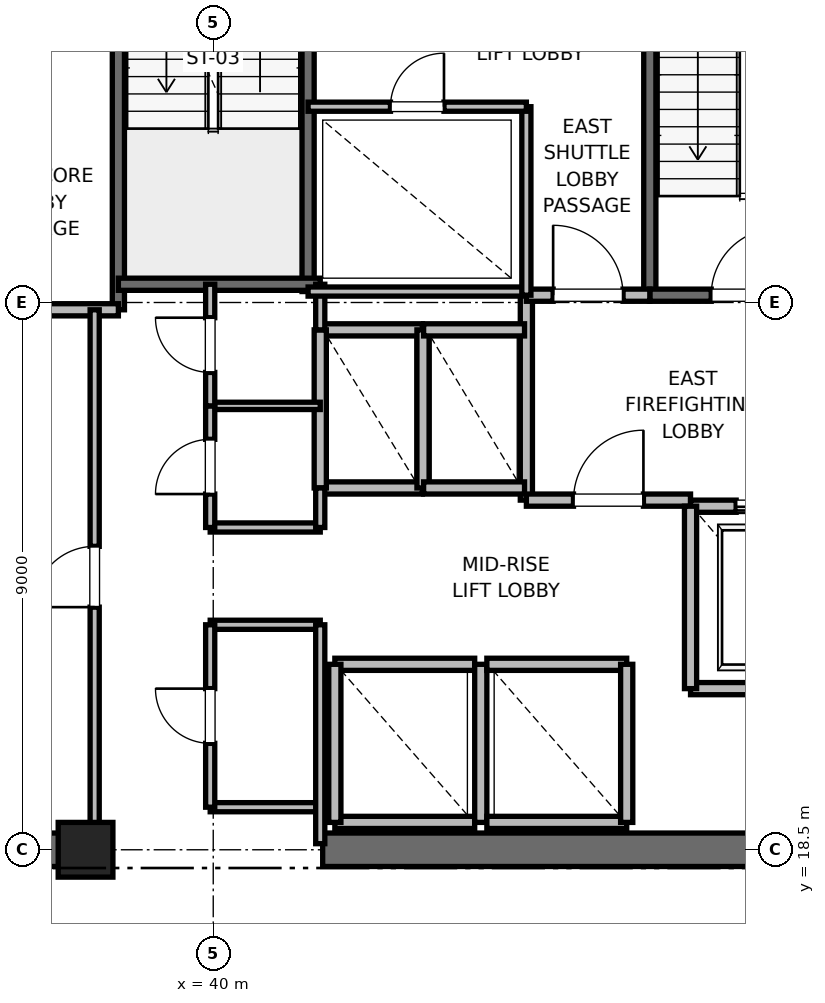
"""IFC4 building model, lengths in metres.
Left out: names, types, materials, properties, quantities, classifications, styles, units other than length and angle.
Written with IfcOpenShell. Run it as: python <this file> out.ifc"""

import sys

from ifc_helpers import new_model, si_unit, direction, frame, frame_2d, origin, origin_2d, place, context, subcontext, project, spatial, rectangle, extrude, element, fill, save


model = new_model("IFC4")
c1 = context("Model", 3, precision=1e-05, world=origin(), true_north=direction((0.0, 1.0)))
c2 = subcontext(c1, "Body", "Model", "MODEL_VIEW")
j1 = project(units=[si_unit("LENGTHUNIT", "METRE"), si_unit("PLANEANGLEUNIT", "RADIAN")], contexts=[c1])
p1 = place(None, origin())
s1 = spatial("IfcSite", under=j1, at=p1, CompositionType="ELEMENT")
p2 = place(p1, origin())
s2 = spatial("IfcBuilding", under=s1, at=p2, CompositionType="ELEMENT")
p3 = place(p2, frame((0.0, 0.0, 238.2)))
s3 = spatial("IfcBuildingStorey", under=s2, at=p3, CompositionType="ELEMENT", Elevation=238.2)
p4 = place(p3, frame((37.9, 18.5, 0.0), z_axis=(0.0, 0.0, 1.0), x_axis=(1.0, 0.0, 0.0)))
e1 = element("IfcColumn", 1, at=p4, inside=s3, PredefinedType="PILASTER", context=c2, shape_type="SweptSolid", body=[
    extrude(rectangle(XDim=0.9, YDim=0.9, at=origin_2d()), origin(), (0.0, 0.0, 1.0), 5.0),
])
for number, where, z_axis, x_axis in (
    (2, (29.0, 18.5, 0.0), (0.0, 0.0, 1.0), (1.0, 0.0, 0.0)),
    (3, (41.8, 18.5, 0.0), (0.0, 0.0, 1.0), (1.0, 0.0, 0.0)),
):
    element("IfcWall", number, at=place(p3, frame(where, z_axis=z_axis, x_axis=x_axis)), inside=s3, PredefinedType="SHEAR", context=c2, shape_type="SweptSolid", body=[
        extrude(rectangle(XDim=9.2, YDim=0.55, at=frame_2d((4.6, 0.0))), origin(), (0.0, 0.0, 1.0), 4.785),
    ])
p5 = place(p3, frame((47.18, 27.62, 0.0), z_axis=(0.0, 0.0, 1.0), x_axis=(0.0, 1.0, 0.0)))
e4 = element("IfcWall", 4, at=p5, inside=s3, PredefinedType="SOLIDWALL", context=c2, shape_type="SweptSolid", body=[
    extrude(rectangle(XDim=8.18, YDim=0.2, at=frame_2d((4.09, 0.0))), origin(), (0.0, 0.0, 1.0), 4.785),
])
p6 = place(p3, frame((47.18, 27.62, 0.0), z_axis=(0.0, 0.0, 1.0), x_axis=(1.0, 0.0, 0.0)))
e5 = element("IfcWall", 5, at=p6, inside=s3, PredefinedType="SOLIDWALL", context=c2, shape_type="SweptSolid", body=[
    extrude(rectangle(XDim=3.12, YDim=0.2, at=frame_2d((1.56, 0.0))), origin(), (0.0, 0.0, 1.0), 4.785),
])
p7 = place(p6, frame((1.01, 0.0, 0.0)))
e6 = element("IfcOpeningElement", 6, at=p7, cuts=e5, PredefinedType="OPENING", context=c2, shape_type="SweptSolid", body=[
    extrude(rectangle(XDim=1.1, YDim=2.15, at=frame_2d((0.55, 1.075))), frame((0.0, 0.1, 0.0), z_axis=(0.0, -1.0, 0.0), x_axis=(1.0, 0.0, 0.0)), (0.0, 0.0, 1.0), 0.2),
])
p8 = place(p3, frame((38.44, 27.38, 0.0), z_axis=(0.0, 0.0, 1.0), x_axis=(0.0, 1.0, 0.0)))
e7 = element("IfcWall", 7, at=p8, inside=s3, PredefinedType="SOLIDWALL", context=c2, shape_type="SweptSolid", body=[
    extrude(rectangle(XDim=8.87, YDim=0.2, at=frame_2d((4.435, 0.0))), origin(), (0.0, 0.0, 1.0), 4.785),
])
p9 = place(p3, frame((41.56, 27.68, 0.0), z_axis=(0.0, 0.0, 1.0), x_axis=(0.0, 1.0, 0.0)))
e8 = element("IfcWall", 8, at=p9, inside=s3, PredefinedType="SOLIDWALL", context=c2, shape_type="SweptSolid", body=[
    extrude(rectangle(XDim=8.57, YDim=0.2, at=frame_2d((4.285, 0.0))), origin(), (0.0, 0.0, 1.0), 4.785),
])
p10 = place(p3, frame((38.44, 27.8, 0.0), z_axis=(0.0, 0.0, 1.0), x_axis=(1.0, 0.0, 0.0)))
e9 = element("IfcWall", 9, at=p10, inside=s3, PredefinedType="SOLIDWALL", context=c2, shape_type="SweptSolid", body=[
    extrude(rectangle(XDim=3.32, YDim=0.2, at=frame_2d((1.66, 0.0))), origin(), (0.0, 0.0, 1.0), 4.785),
])
p11 = place(p3, frame((32.82, 27.38, 0.0), z_axis=(0.0, 0.0, 1.0), x_axis=(1.0, 0.0, 0.0)))
e10 = element("IfcWall", 10, at=p11, inside=s3, PredefinedType="PARTITIONING", context=c2, shape_type="SweptSolid", body=[
    extrude(rectangle(XDim=5.62, YDim=0.2, at=frame_2d((2.81, 0.0))), origin(), (0.0, 0.0, 1.0), 4.785),
])
p12 = place(p3, frame((45.15, 24.25, 0.0), z_axis=(0.0, 0.0, 1.0), x_axis=(0.0, 1.0, 0.0)))
e11 = element("IfcWall", 11, at=p12, inside=s3, PredefinedType="PARTITIONING", context=c2, shape_type="SweptSolid", body=[
    extrude(rectangle(XDim=3.37, YDim=0.2, at=frame_2d((1.685, 0.0))), origin(), (0.0, 0.0, 1.0), 4.785),
])
p13 = place(p3, frame((45.15, 24.25, 0.0), z_axis=(0.0, 0.0, 1.0), x_axis=(1.0, 0.0, 0.0)))
e12 = element("IfcWall", 12, at=p13, inside=s3, PredefinedType="PARTITIONING", context=c2, shape_type="SweptSolid", body=[
    extrude(rectangle(XDim=2.7, YDim=0.2, at=frame_2d((1.35, 0.0))), origin(), (0.0, 0.0, 1.0), 4.785),
])
p14 = place(p13, frame((0.775, 0.0, 0.0)))
e13 = element("IfcOpeningElement", 13, at=p14, cuts=e12, PredefinedType="OPENING", context=c2, shape_type="SweptSolid", body=[
    extrude(rectangle(XDim=1.15, YDim=2.2, at=frame_2d((0.575, 1.1))), frame((0.0, 0.1, 0.0), z_axis=(0.0, -1.0, 0.0), x_axis=(1.0, 0.0, 0.0)), (0.0, 0.0, 1.0), 0.2),
])
p15 = place(p3, frame((45.15, 27.62, 0.0), z_axis=(0.0, 0.0, 1.0), x_axis=(1.0, 0.0, 0.0)))
e14 = element("IfcWall", 14, at=p15, inside=s3, PredefinedType="PARTITIONING", context=c2, shape_type="SweptSolid", body=[
    extrude(rectangle(XDim=2.03, YDim=0.2, at=frame_2d((1.015, 0.0))), origin(), (0.0, 0.0, 1.0), 4.785),
])
p16 = place(p15, frame((0.44, 0.0, 0.0)))
e15 = element("IfcOpeningElement", 15, at=p16, cuts=e14, PredefinedType="OPENING", context=c2, shape_type="SweptSolid", body=[
    extrude(rectangle(XDim=1.15, YDim=2.2, at=frame_2d((0.575, 1.1))), frame((0.0, 0.1, 0.0), z_axis=(0.0, -1.0, 0.0), x_axis=(1.0, 0.0, 0.0)), (0.0, 0.0, 1.0), 0.2),
])
p17 = place(p3, frame((47.85, 21.15, 0.0), z_axis=(0.0, 0.0, 1.0), x_axis=(1.0, 0.0, 0.0)))
e16 = element("IfcWall", 16, at=p17, inside=s3, PredefinedType="SOLIDWALL", context=c2, shape_type="SweptSolid", body=[
    extrude(rectangle(XDim=2.6, YDim=0.2, at=frame_2d((1.3, 0.0))), origin(), (0.0, 0.0, 1.0), 4.785),
])
p18 = place(p3, frame((50.45, 24.15, 0.0), z_axis=(0.0, 0.0, 1.0), x_axis=(-1.0, 0.0, 0.0)))
e17 = element("IfcWall", 17, at=p18, inside=s3, PredefinedType="SOLIDWALL", context=c2, shape_type="SweptSolid", body=[
    extrude(rectangle(XDim=2.6, YDim=0.2, at=frame_2d((1.3, 0.0))), origin(), (0.0, 0.0, 1.0), 3.765),
])
p19 = place(p18, frame((0.75, 0.0, 0.0)))
e18 = element("IfcOpeningElement", 18, at=p19, cuts=e17, PredefinedType="OPENING", context=c2, shape_type="SweptSolid", body=[
    extrude(rectangle(XDim=1.1, YDim=2.2, at=frame_2d((0.55, 1.1))), frame((0.0, 0.1, 0.0), z_axis=(0.0, -1.0, 0.0), x_axis=(1.0, 0.0, 0.0)), (0.0, 0.0, 1.0), 0.2),
])
p20 = place(p3, frame((47.85, 24.15, 0.0), z_axis=(0.0, 0.0, 1.0), x_axis=(0.0, -1.0, 0.0)))
e19 = element("IfcWall", 19, at=p20, inside=s3, PredefinedType="SOLIDWALL", context=c2, shape_type="SweptSolid", body=[
    extrude(rectangle(XDim=3.0, YDim=0.2, at=frame_2d((1.5, 0.0))), origin(), (0.0, 0.0, 1.0), 4.785),
])
p21 = place(p3, frame((42.0, 18.95, 0.0), z_axis=(0.0, 0.0, 1.0), x_axis=(1.0, 0.0, 0.0)))
e20 = element("IfcWall", 20, at=p21, inside=s3, PredefinedType="SOLIDWALL", context=c2, shape_type="SweptSolid", body=[
    extrude(rectangle(XDim=2.3, YDim=0.2, at=frame_2d((1.15, 0.0))), origin(), (0.0, 0.0, 1.0), 3.765),
])
p22 = place(p3, frame((44.3, 21.55, 0.0), z_axis=(0.0, 0.0, 1.0), x_axis=(-1.0, 0.0, 0.0)))
e21 = element("IfcWall", 21, at=p22, inside=s3, PredefinedType="SOLIDWALL", context=c2, shape_type="SweptSolid", body=[
    extrude(rectangle(XDim=2.3, YDim=0.2, at=frame_2d((1.15, 0.0))), origin(), (0.0, 0.0, 1.0), 4.785),
])
p23 = place(p3, frame((42.0, 21.55, 0.0), z_axis=(0.0, 0.0, 1.0), x_axis=(0.0, -1.0, 0.0)))
e22 = element("IfcWall", 22, at=p23, inside=s3, PredefinedType="SOLIDWALL", context=c2, shape_type="SweptSolid", body=[
    extrude(rectangle(XDim=2.6, YDim=0.2, at=frame_2d((1.3, 0.0))), origin(), (0.0, 0.0, 1.0), 3.765),
])
p24 = place(p3, frame((44.4, 18.95, 0.0), z_axis=(0.0, 0.0, 1.0), x_axis=(0.0, 1.0, 0.0)))
e23 = element("IfcWall", 23, at=p24, inside=s3, PredefinedType="SOLIDWALL", context=c2, shape_type="SweptSolid", body=[
    extrude(rectangle(XDim=2.6, YDim=0.2, at=frame_2d((1.3, 0.0))), origin(), (0.0, 0.0, 1.0), 4.785),
])
for number, where, z_axis, x_axis in (
    (24, (44.5, 18.95, 0.0), (0.0, 0.0, 1.0), (1.0, 0.0, 0.0)),
    (25, (46.8, 21.55, 0.0), (0.0, 0.0, 1.0), (-1.0, 0.0, 0.0)),
):
    element("IfcWall", number, at=place(p3, frame(where, z_axis=z_axis, x_axis=x_axis)), inside=s3, PredefinedType="SOLIDWALL", context=c2, shape_type="SweptSolid", body=[
        extrude(rectangle(XDim=2.3, YDim=0.2, at=frame_2d((1.15, 0.0))), origin(), (0.0, 0.0, 1.0), 4.785),
    ])
p25 = place(p3, frame((46.8, 18.95, 0.0), z_axis=(0.0, 0.0, 1.0), x_axis=(0.0, 1.0, 0.0)))
e26 = element("IfcWall", 26, at=p25, inside=s3, PredefinedType="SOLIDWALL", context=c2, shape_type="SweptSolid", body=[
    extrude(rectangle(XDim=2.6, YDim=0.2, at=frame_2d((1.3, 0.0))), origin(), (0.0, 0.0, 1.0), 4.785),
])
for number, where, z_axis, x_axis in (
    (27, (41.76, 24.45, 0.0), (0.0, 0.0, 1.0), (1.0, 0.0, 0.0)),
    (28, (43.44, 27.05, 0.0), (0.0, 0.0, 1.0), (-1.0, 0.0, 0.0)),
):
    element("IfcWall", number, at=place(p3, frame(where, z_axis=z_axis, x_axis=x_axis)), inside=s3, PredefinedType="SOLIDWALL", context=c2, shape_type="SweptSolid", body=[
        extrude(rectangle(XDim=1.68, YDim=0.2, at=frame_2d((0.84, 0.0))), origin(), (0.0, 0.0, 1.0), 4.785),
    ])
for number, where, z_axis, x_axis in (
    (29, (41.76, 27.05, 0.0), (0.0, 0.0, 1.0), (0.0, -1.0, 0.0)),
    (30, (43.45, 24.45, 0.0), (0.0, 0.0, 1.0), (0.0, 1.0, 0.0)),
):
    element("IfcWall", number, at=place(p3, frame(where, z_axis=z_axis, x_axis=x_axis)), inside=s3, PredefinedType="SOLIDWALL", context=c2, shape_type="SweptSolid", body=[
        extrude(rectangle(XDim=2.6, YDim=0.2, at=frame_2d((1.3, 0.0))), origin(), (0.0, 0.0, 1.0), 4.785),
    ])
for number, where, z_axis, x_axis in (
    (31, (43.46, 24.45, 0.0), (0.0, 0.0, 1.0), (1.0, 0.0, 0.0)),
    (32, (45.12, 27.05, 0.0), (0.0, 0.0, 1.0), (-1.0, 0.0, 0.0)),
):
    element("IfcWall", number, at=place(p3, frame(where, z_axis=z_axis, x_axis=x_axis)), inside=s3, PredefinedType="SOLIDWALL", context=c2, shape_type="SweptSolid", body=[
        extrude(rectangle(XDim=1.66, YDim=0.2, at=frame_2d((0.83, 0.0))), origin(), (0.0, 0.0, 1.0), 4.785),
    ])
for number, where, z_axis, x_axis in (
    (33, (39.95, 19.2, 0.0), (0.0, 0.0, 1.0), (1.0, 0.0, 0.0)),
    (34, (39.95, 22.2, 0.0), (0.0, 0.0, 1.0), (1.0, 0.0, 0.0)),
    (35, (39.95, 23.8, 0.0), (0.0, 0.0, 1.0), (1.0, 0.0, 0.0)),
):
    element("IfcWall", number, at=place(p3, frame(where, z_axis=z_axis, x_axis=x_axis)), inside=s3, PredefinedType="PARTITIONING", context=c2, shape_type="SweptSolid", body=[
        extrude(rectangle(XDim=1.81, YDim=0.15, at=frame_2d((0.905, 0.0))), origin(), (0.0, 0.0, 1.0), 2.85),
    ])
p26 = place(p3, frame((39.95, 25.8, 0.0), z_axis=(0.0, 0.0, 1.0), x_axis=(1.0, 0.0, 0.0)))
e36 = element("IfcWall", 36, at=p26, inside=s3, PredefinedType="PARTITIONING", context=c2, shape_type="SweptSolid", body=[
    extrude(rectangle(XDim=1.81, YDim=0.12, at=frame_2d((0.905, 0.0))), origin(), (0.0, 0.0, 1.0), 2.85),
])
p27 = place(p3, frame((41.76, 18.6, 0.0), z_axis=(0.0, 0.0, 1.0), x_axis=(0.0, 1.0, 0.0)))
e37 = element("IfcWall", 37, at=p27, inside=s3, PredefinedType="PARTITIONING", context=c2, shape_type="SweptSolid", body=[
    extrude(rectangle(XDim=3.6, YDim=0.15, at=frame_2d((1.8, 0.0))), origin(), (0.0, 0.0, 1.0), 2.85),
])
p28 = place(p3, frame((41.76, 23.8, 0.0), z_axis=(0.0, 0.0, 1.0), x_axis=(0.0, 1.0, 0.0)))
e38 = element("IfcWall", 38, at=p28, inside=s3, PredefinedType="PARTITIONING", context=c2, shape_type="SweptSolid", body=[
    extrude(rectangle(XDim=0.65, YDim=0.15, at=frame_2d((0.325, 0.0))), origin(), (0.0, 0.0, 1.0), 2.85),
])
p29 = place(p3, frame((41.76, 27.05, 0.0), z_axis=(0.0, 0.0, 1.0), x_axis=(0.0, 1.0, 0.0)))
e39 = element("IfcWall", 39, at=p29, inside=s3, PredefinedType="PARTITIONING", context=c2, shape_type="SweptSolid", body=[
    extrude(rectangle(XDim=0.75, YDim=0.15, at=frame_2d((0.375, 0.0))), origin(), (0.0, 0.0, 1.0), 2.85),
])
p30 = place(p3, frame((39.95, 19.2, 0.0), z_axis=(0.0, 0.0, 1.0), x_axis=(0.0, 1.0, 0.0)))
e40 = element("IfcWall", 40, at=p30, inside=s3, PredefinedType="PARTITIONING", context=c2, shape_type="SweptSolid", body=[
    extrude(rectangle(XDim=3.0, YDim=0.15, at=frame_2d((1.5, 0.0))), origin(), (0.0, 0.0, 1.0), 2.85),
])
p31 = place(p30, frame((1.05, 0.0, 0.0)))
e41 = element("IfcOpeningElement", 41, at=p31, cuts=e40, PredefinedType="OPENING", context=c2, shape_type="SweptSolid", body=[
    extrude(rectangle(XDim=0.9, YDim=2.1, at=frame_2d((0.45, 1.05))), frame((0.0, 0.075, 0.0), z_axis=(0.0, -1.0, 0.0), x_axis=(1.0, 0.0, 0.0)), (0.0, 0.0, 1.0), 0.15),
])
p32 = place(p3, frame((39.95, 23.8, 0.0), z_axis=(0.0, 0.0, 1.0), x_axis=(0.0, 1.0, 0.0)))
e42 = element("IfcWall", 42, at=p32, inside=s3, PredefinedType="PARTITIONING", context=c2, shape_type="SweptSolid", body=[
    extrude(rectangle(XDim=2.0, YDim=0.15, at=frame_2d((1.0, 0.0))), origin(), (0.0, 0.0, 1.0), 2.85),
])
p33 = place(p32, frame((0.55, 0.0, 0.0)))
e43 = element("IfcOpeningElement", 43, at=p33, cuts=e42, PredefinedType="OPENING", context=c2, shape_type="SweptSolid", body=[
    extrude(rectangle(XDim=0.9, YDim=2.1, at=frame_2d((0.45, 1.05))), frame((0.0, 0.075, 0.0), z_axis=(0.0, -1.0, 0.0), x_axis=(1.0, 0.0, 0.0)), (0.0, 0.0, 1.0), 0.15),
])
p34 = place(p3, frame((39.95, 25.8, 0.0), z_axis=(0.0, 0.0, 1.0), x_axis=(0.0, 1.0, 0.0)))
e44 = element("IfcWall", 44, at=p34, inside=s3, PredefinedType="PARTITIONING", context=c2, shape_type="SweptSolid", body=[
    extrude(rectangle(XDim=2.0, YDim=0.15, at=frame_2d((1.0, 0.0))), origin(), (0.0, 0.0, 1.0), 2.85),
])
p35 = place(p34, frame((0.55, 0.0, 0.0)))
e45 = element("IfcOpeningElement", 45, at=p35, cuts=e44, PredefinedType="OPENING", context=c2, shape_type="SweptSolid", body=[
    extrude(rectangle(XDim=0.9, YDim=2.1, at=frame_2d((0.45, 1.05))), frame((0.0, 0.075, 0.0), z_axis=(0.0, -1.0, 0.0), x_axis=(1.0, 0.0, 0.0)), (0.0, 0.0, 1.0), 0.15),
])
p36 = place(p3, frame((38.05, 18.6, 0.0), z_axis=(0.0, 0.0, 1.0), x_axis=(0.0, 1.0, 0.0)))
e46 = element("IfcWall", 46, at=p36, inside=s3, PredefinedType="PARTITIONING", context=c2, shape_type="SweptSolid", body=[
    extrude(rectangle(XDim=8.78, YDim=0.15, at=frame_2d((4.39, 0.0))), origin(), (0.0, 0.0, 1.0), 2.85),
])
p37 = place(p36, frame((3.89, 0.0, 0.0)))
e47 = element("IfcOpeningElement", 47, at=p37, cuts=e46, PredefinedType="OPENING", context=c2, shape_type="SweptSolid", body=[
    extrude(rectangle(XDim=1.0, YDim=2.15, at=frame_2d((0.5, 1.075))), frame((0.0, 0.075, 0.0), z_axis=(0.0, -1.0, 0.0), x_axis=(1.0, 0.0, 0.0)), (0.0, 0.0, 1.0), 0.15),
])
p38 = place(p3, frame((41.56, 27.68, 0.0), z_axis=(0.0, 0.0, 1.0), x_axis=(1.0, 0.0, 0.0)))
e48 = element("IfcWall", 48, at=p38, inside=s3, PredefinedType="PARTITIONING", context=c2, shape_type="SweptSolid", body=[
    extrude(rectangle(XDim=3.59, YDim=0.15, at=frame_2d((1.795, 0.0))), origin(), (0.0, 0.0, 1.0), 2.85),
])
p39 = place(p3, frame((45.15, 27.62, 0.0), z_axis=(0.0, 0.0, 1.0), x_axis=(0.0, 1.0, 0.0)))
e49 = element("IfcWall", 49, at=p39, inside=s3, PredefinedType="PARTITIONING", context=c2, shape_type="SweptSolid", body=[
    extrude(rectangle(XDim=3.1, YDim=0.15, at=frame_2d((1.55, 0.0))), origin(), (0.0, 0.0, 1.0), 2.85),
])
p40 = place(p3, frame((41.56, 30.72, 0.0), z_axis=(0.0, 0.0, 1.0), x_axis=(1.0, 0.0, 0.0)))
e50 = element("IfcWall", 50, at=p40, inside=s3, PredefinedType="PARTITIONING", context=c2, shape_type="SweptSolid", body=[
    extrude(rectangle(XDim=3.59, YDim=0.15, at=frame_2d((1.795, 0.0))), origin(), (0.0, 0.0, 1.0), 2.85),
])
p41 = place(p40, frame((1.355, 0.0, 0.0)))
e51 = element("IfcOpeningElement", 51, at=p41, cuts=e50, PredefinedType="OPENING", context=c2, shape_type="SweptSolid", body=[
    extrude(rectangle(XDim=0.88, YDim=2.1, at=frame_2d((0.44, 1.05))), frame((0.0, 0.075, 0.0), z_axis=(0.0, -1.0, 0.0), x_axis=(1.0, 0.0, 0.0)), (0.0, 0.0, 1.0), 0.15),
])
p42 = place(p7, origin())
e52 = element("IfcDoor", 52, at=p42, inside=s3, OperationType="SINGLE_SWING_RIGHT", PredefinedType="DOOR", context=c2, shape_type="SweptSolid", body=[
    extrude(rectangle(XDim=1.1, YDim=2.15, at=frame_2d((0.55, 1.075))), frame((0.0, 0.025, 0.0), z_axis=(0.0, -1.0, 0.0), x_axis=(1.0, 0.0, 0.0)), (0.0, 0.0, 1.0), 0.05),
])
fill(e6, e52)
p43 = place(p14, origin())
e53 = element("IfcDoor", 53, at=p43, inside=s3, OperationType="SINGLE_SWING_RIGHT", PredefinedType="DOOR", context=c2, shape_type="SweptSolid", body=[
    extrude(rectangle(XDim=1.15, YDim=2.2, at=frame_2d((0.575, 1.1))), frame((0.0, 0.025, 0.0), z_axis=(0.0, -1.0, 0.0), x_axis=(1.0, 0.0, 0.0)), (0.0, 0.0, 1.0), 0.05),
])
fill(e13, e53)
p44 = place(p16, origin())
e54 = element("IfcDoor", 54, at=p44, inside=s3, OperationType="SINGLE_SWING_LEFT", PredefinedType="DOOR", context=c2, shape_type="SweptSolid", body=[
    extrude(rectangle(XDim=1.15, YDim=2.2, at=frame_2d((0.575, 1.1))), frame((0.0, 0.025, 0.0), z_axis=(0.0, -1.0, 0.0), x_axis=(1.0, 0.0, 0.0)), (0.0, 0.0, 1.0), 0.05),
])
fill(e15, e54)
p45 = place(p19, origin())
e55 = element("IfcDoor", 55, at=p45, inside=s3, OperationType="SLIDING_TO_RIGHT", PredefinedType="DOOR", context=c2, shape_type="SweptSolid", body=[
    extrude(rectangle(XDim=1.1, YDim=2.2, at=frame_2d((0.55, 1.1))), frame((0.0, 0.025, 0.0), z_axis=(0.0, -1.0, 0.0), x_axis=(1.0, 0.0, 0.0)), (0.0, 0.0, 1.0), 0.05),
])
fill(e18, e55)
p46 = place(p31, origin())
e56 = element("IfcDoor", 56, at=p46, inside=s3, OperationType="SINGLE_SWING_RIGHT", PredefinedType="DOOR", context=c2, shape_type="SweptSolid", body=[
    extrude(rectangle(XDim=0.9, YDim=2.1, at=frame_2d((0.45, 1.05))), frame((0.0, 0.025, 0.0), z_axis=(0.0, -1.0, 0.0), x_axis=(1.0, 0.0, 0.0)), (0.0, 0.0, 1.0), 0.05),
])
fill(e41, e56)
p47 = place(p33, origin())
e57 = element("IfcDoor", 57, at=p47, inside=s3, OperationType="SINGLE_SWING_LEFT", PredefinedType="DOOR", context=c2, shape_type="SweptSolid", body=[
    extrude(rectangle(XDim=0.9, YDim=2.1, at=frame_2d((0.45, 1.05))), frame((0.0, 0.025, 0.0), z_axis=(0.0, -1.0, 0.0), x_axis=(1.0, 0.0, 0.0)), (0.0, 0.0, 1.0), 0.05),
])
fill(e43, e57)
p48 = place(p35, origin())
e58 = element("IfcDoor", 58, at=p48, inside=s3, OperationType="SINGLE_SWING_RIGHT", PredefinedType="DOOR", context=c2, shape_type="SweptSolid", body=[
    extrude(rectangle(XDim=0.9, YDim=2.1, at=frame_2d((0.45, 1.05))), frame((0.0, 0.025, 0.0), z_axis=(0.0, -1.0, 0.0), x_axis=(1.0, 0.0, 0.0)), (0.0, 0.0, 1.0), 0.05),
])
fill(e45, e58)
p49 = place(p37, origin())
e59 = element("IfcDoor", 59, at=p49, inside=s3, OperationType="SINGLE_SWING_LEFT", PredefinedType="DOOR", context=c2, shape_type="SweptSolid", body=[
    extrude(rectangle(XDim=1.0, YDim=2.15, at=frame_2d((0.5, 1.075))), frame((0.0, 0.025, 0.0), z_axis=(0.0, -1.0, 0.0), x_axis=(1.0, 0.0, 0.0)), (0.0, 0.0, 1.0), 0.05),
])
fill(e47, e59)
p50 = place(p41, origin())
e60 = element("IfcDoor", 60, at=p50, inside=s3, OperationType="SINGLE_SWING_RIGHT", PredefinedType="DOOR", context=c2, shape_type="SweptSolid", body=[
    extrude(rectangle(XDim=0.88, YDim=2.1, at=frame_2d((0.44, 1.05))), frame((0.0, 0.025, 0.0), z_axis=(0.0, -1.0, 0.0), x_axis=(1.0, 0.0, 0.0)), (0.0, 0.0, 1.0), 0.05),
])
fill(e51, e60)
save(model, sys.argv[1])
